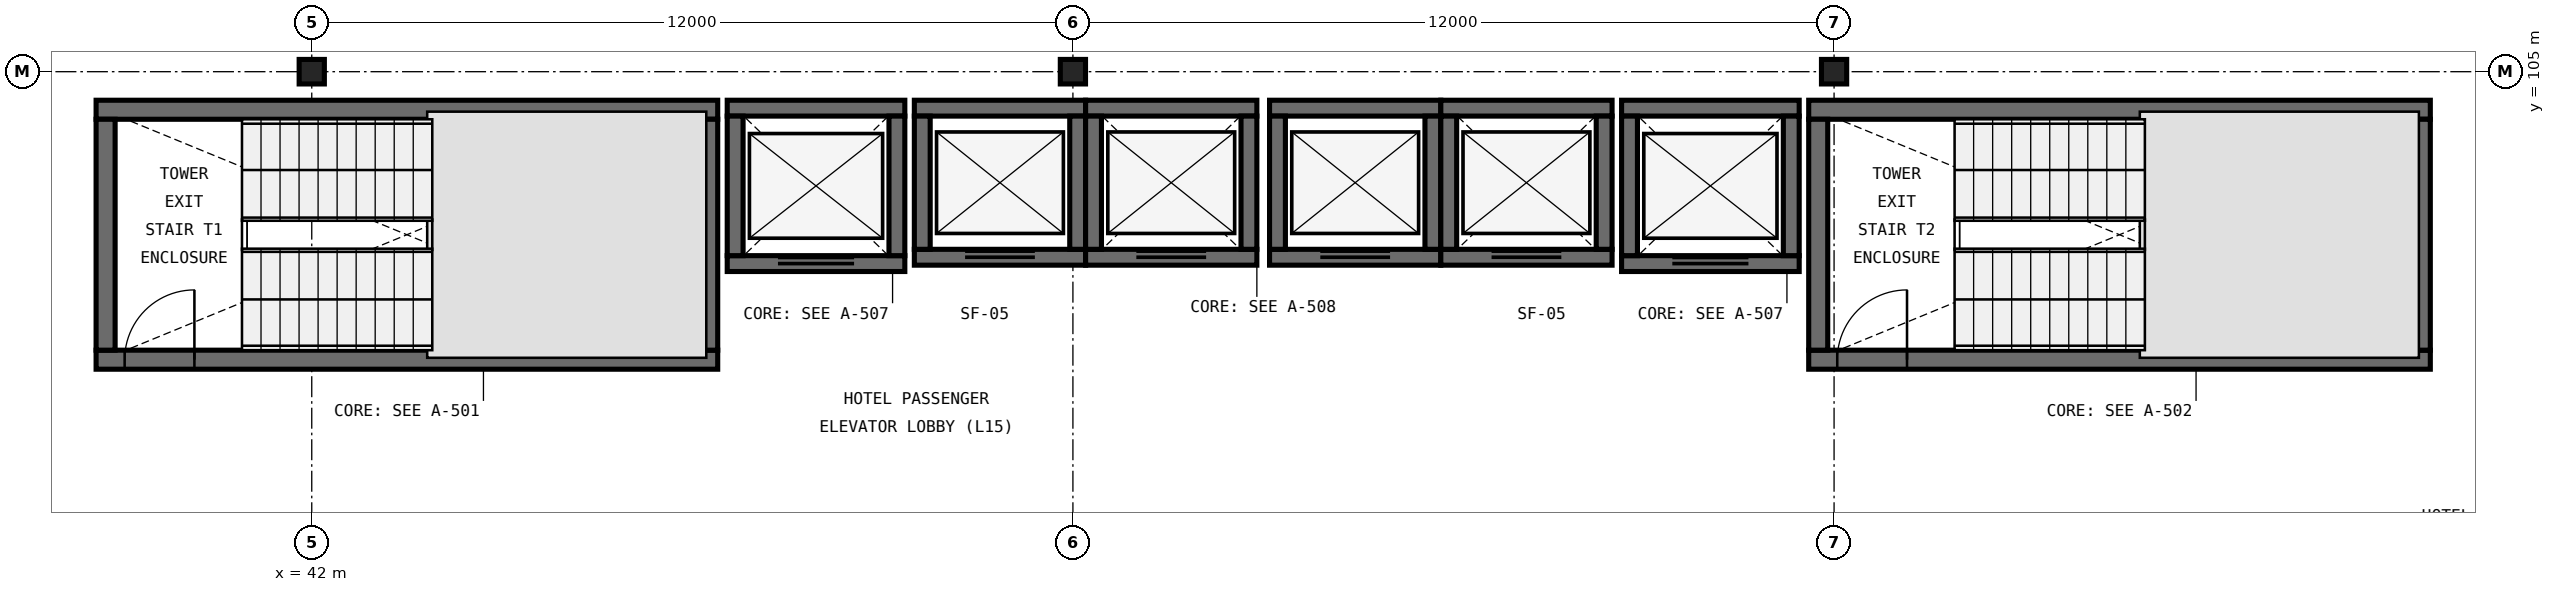
"""IFC4 building model, lengths in metres.
Left out: names, types, materials, properties, quantities, classifications, styles, units other than length and angle.
Written with IfcOpenShell. Run it as: python <this file> out.ifc"""

import sys

from ifc_helpers import new_model, si_unit, direction, frame, frame_2d, origin, origin_2d, place, context, subcontext, project, spatial, rectangle, i_section, extrude, element, fill, save


model = new_model("IFC4")
c1 = context("Model", 3, precision=1e-05, world=origin(), true_north=direction((0.0, 1.0)))
c2 = subcontext(c1, "Body", "Model", "MODEL_VIEW")
j1 = project(units=[si_unit("LENGTHUNIT", "METRE"), si_unit("PLANEANGLEUNIT", "RADIAN")], contexts=[c1])
p1 = place(None, origin())
s1 = spatial("IfcSite", under=j1, at=p1, CompositionType="ELEMENT")
p2 = place(p1, origin())
s2 = spatial("IfcBuilding", under=s1, at=p2, CompositionType="ELEMENT")
p3 = place(p2, frame((0.0, 0.0, 63.6)))
s3 = spatial("IfcBuildingStorey", under=s2, at=p3, CompositionType="ELEMENT", Elevation=63.6)
for number, where, z_axis, x_axis in (
    (1, (42.0, 105.0, 0.0), (0.0, 0.0, 1.0), (1.0, 0.0, 0.0)),
    (2, (54.0, 105.0, 0.0), (0.0, 0.0, 1.0), (1.0, 0.0, 0.0)),
    (3, (66.0, 105.0, 0.0), (0.0, 0.0, 1.0), (1.0, 0.0, 0.0)),
):
    element("IfcColumn", number, at=place(p3, frame(where, z_axis=z_axis, x_axis=x_axis)), inside=s3, PredefinedType="COLUMN", context=c2, shape_type="SweptSolid", body=[
        extrude(i_section(OverallWidth=0.398, OverallDepth=0.387, WebThickness=0.021, FlangeThickness=0.033, FilletRadius=0.031, at=origin_2d()), origin(), (0.0, 0.0, 1.0), 3.6),
    ])
p4 = place(p3, frame((38.6, 100.46, 0.0), z_axis=(0.0, 0.0, 1.0), x_axis=(1.0, 0.0, 0.0)))
e4 = element("IfcWall", 4, at=p4, inside=s3, PredefinedType="SHEAR", context=c2, shape_type="SweptSolid", body=[
    extrude(rectangle(XDim=9.8, YDim=0.3, at=frame_2d((4.9, 0.0))), origin(), (0.0, 0.0, 1.0), 3.6),
])
p5 = place(p4, frame((0.45, 0.0, 0.0)))
e5 = element("IfcOpeningElement", 5, at=p5, cuts=e4, PredefinedType="OPENING", context=c2, shape_type="SweptSolid", body=[
    extrude(rectangle(XDim=1.1, YDim=2.2, at=frame_2d((0.55, 1.1))), frame((0.0, 0.165, 0.0), z_axis=(0.0, -1.0, 0.0), x_axis=(1.0, 0.0, 0.0)), (0.0, 0.0, 1.0), 0.33),
])
p6 = place(p3, frame((48.4, 104.4, 0.0), z_axis=(0.0, 0.0, 1.0), x_axis=(-1.0, 0.0, 0.0)))
e6 = element("IfcWall", 6, at=p6, inside=s3, PredefinedType="SHEAR", context=c2, shape_type="SweptSolid", body=[
    extrude(rectangle(XDim=9.8, YDim=0.3, at=frame_2d((4.9, 0.0))), origin(), (0.0, 0.0, 1.0), 3.6),
])
for number, where, z_axis, x_axis in (
    (7, (38.75, 104.25, 0.0), (0.0, 0.0, 1.0), (0.0, -1.0, 0.0)),
    (8, (48.25, 100.61, 0.0), (0.0, 0.0, 1.0), (0.0, 1.0, 0.0)),
):
    element("IfcWall", number, at=place(p3, frame(where, z_axis=z_axis, x_axis=x_axis)), inside=s3, PredefinedType="SHEAR", context=c2, shape_type="SweptSolid", body=[
        extrude(rectangle(XDim=3.64, YDim=0.3, at=frame_2d((1.82, 0.0))), origin(), (0.0, 0.0, 1.0), 3.6),
    ])
p7 = place(p3, frame((65.6, 100.46, 0.0), z_axis=(0.0, 0.0, 1.0), x_axis=(1.0, 0.0, 0.0)))
e9 = element("IfcWall", 9, at=p7, inside=s3, PredefinedType="SHEAR", context=c2, shape_type="SweptSolid", body=[
    extrude(rectangle(XDim=9.8, YDim=0.3, at=frame_2d((4.9, 0.0))), origin(), (0.0, 0.0, 1.0), 3.6),
])
p8 = place(p7, frame((0.45, 0.0, 0.0)))
e10 = element("IfcOpeningElement", 10, at=p8, cuts=e9, PredefinedType="OPENING", context=c2, shape_type="SweptSolid", body=[
    extrude(rectangle(XDim=1.1, YDim=2.2, at=frame_2d((0.55, 1.1))), frame((0.0, 0.165, 0.0), z_axis=(0.0, -1.0, 0.0), x_axis=(1.0, 0.0, 0.0)), (0.0, 0.0, 1.0), 0.33),
])
p9 = place(p3, frame((75.4, 104.4, 0.0), z_axis=(0.0, 0.0, 1.0), x_axis=(-1.0, 0.0, 0.0)))
e11 = element("IfcWall", 11, at=p9, inside=s3, PredefinedType="SHEAR", context=c2, shape_type="SweptSolid", body=[
    extrude(rectangle(XDim=9.8, YDim=0.3, at=frame_2d((4.9, 0.0))), origin(), (0.0, 0.0, 1.0), 3.6),
])
for number, where, z_axis, x_axis in (
    (12, (65.75, 104.25, 0.0), (0.0, 0.0, 1.0), (0.0, -1.0, 0.0)),
    (13, (75.25, 100.61, 0.0), (0.0, 0.0, 1.0), (0.0, 1.0, 0.0)),
):
    element("IfcWall", number, at=place(p3, frame(where, z_axis=z_axis, x_axis=x_axis)), inside=s3, PredefinedType="SHEAR", context=c2, shape_type="SweptSolid", body=[
        extrude(rectangle(XDim=3.64, YDim=0.3, at=frame_2d((1.82, 0.0))), origin(), (0.0, 0.0, 1.0), 3.6),
    ])
p10 = place(p3, frame((48.55, 101.975, 0.0), z_axis=(0.0, 0.0, 1.0), x_axis=(1.0, 0.0, 0.0)))
e14 = element("IfcWall", 14, at=p10, inside=s3, PredefinedType="SHEAR", context=c2, shape_type="SweptSolid", body=[
    extrude(rectangle(XDim=2.8, YDim=0.25, at=frame_2d((1.4, 0.0))), origin(), (0.0, 0.0, 1.0), 3.6),
])
p11 = place(p10, frame((0.8, 0.0, 0.0)))
e15 = element("IfcOpeningElement", 15, at=p11, cuts=e14, PredefinedType="OPENING", context=c2, shape_type="SweptSolid", body=[
    extrude(rectangle(XDim=1.2, YDim=2.2, at=frame_2d((0.6, 1.1))), frame((0.0, 0.14, 0.0), z_axis=(0.0, -1.0, 0.0), x_axis=(1.0, 0.0, 0.0)), (0.0, 0.0, 1.0), 0.28),
])
p12 = place(p3, frame((51.35, 104.425, 0.0), z_axis=(0.0, 0.0, 1.0), x_axis=(-1.0, 0.0, 0.0)))
e16 = element("IfcWall", 16, at=p12, inside=s3, PredefinedType="SHEAR", context=c2, shape_type="SweptSolid", body=[
    extrude(rectangle(XDim=2.8, YDim=0.25, at=frame_2d((1.4, 0.0))), origin(), (0.0, 0.0, 1.0), 3.6),
])
for number, where, z_axis, x_axis in (
    (17, (48.675, 104.3, 0.0), (0.0, 0.0, 1.0), (0.0, -1.0, 0.0)),
    (18, (51.225, 102.1, 0.0), (0.0, 0.0, 1.0), (0.0, 1.0, 0.0)),
):
    element("IfcWall", number, at=place(p3, frame(where, z_axis=z_axis, x_axis=x_axis)), inside=s3, PredefinedType="SHEAR", context=c2, shape_type="SweptSolid", body=[
        extrude(rectangle(XDim=2.2, YDim=0.25, at=frame_2d((1.1, 0.0))), origin(), (0.0, 0.0, 1.0), 3.6),
    ])
p13 = place(p3, frame((62.65, 101.975, 0.0), z_axis=(0.0, 0.0, 1.0), x_axis=(1.0, 0.0, 0.0)))
e19 = element("IfcWall", 19, at=p13, inside=s3, PredefinedType="SHEAR", context=c2, shape_type="SweptSolid", body=[
    extrude(rectangle(XDim=2.8, YDim=0.25, at=frame_2d((1.4, 0.0))), origin(), (0.0, 0.0, 1.0), 3.6),
])
p14 = place(p13, frame((0.8, 0.0, 0.0)))
e20 = element("IfcOpeningElement", 20, at=p14, cuts=e19, PredefinedType="OPENING", context=c2, shape_type="SweptSolid", body=[
    extrude(rectangle(XDim=1.2, YDim=2.2, at=frame_2d((0.6, 1.1))), frame((0.0, 0.14, 0.0), z_axis=(0.0, -1.0, 0.0), x_axis=(1.0, 0.0, 0.0)), (0.0, 0.0, 1.0), 0.28),
])
p15 = place(p3, frame((65.45, 104.425, 0.0), z_axis=(0.0, 0.0, 1.0), x_axis=(-1.0, 0.0, 0.0)))
e21 = element("IfcWall", 21, at=p15, inside=s3, PredefinedType="SHEAR", context=c2, shape_type="SweptSolid", body=[
    extrude(rectangle(XDim=2.8, YDim=0.25, at=frame_2d((1.4, 0.0))), origin(), (0.0, 0.0, 1.0), 3.6),
])
for number, where, z_axis, x_axis in (
    (22, (62.775, 104.3, 0.0), (0.0, 0.0, 1.0), (0.0, -1.0, 0.0)),
    (23, (65.325, 102.1, 0.0), (0.0, 0.0, 1.0), (0.0, 1.0, 0.0)),
):
    element("IfcWall", number, at=place(p3, frame(where, z_axis=z_axis, x_axis=x_axis)), inside=s3, PredefinedType="SHEAR", context=c2, shape_type="SweptSolid", body=[
        extrude(rectangle(XDim=2.2, YDim=0.25, at=frame_2d((1.1, 0.0))), origin(), (0.0, 0.0, 1.0), 3.6),
    ])
p16 = place(p3, frame((51.5, 102.075, 0.0), z_axis=(0.0, 0.0, 1.0), x_axis=(1.0, 0.0, 0.0)))
e24 = element("IfcWall", 24, at=p16, inside=s3, PredefinedType="SHEAR", context=c2, shape_type="SweptSolid", body=[
    extrude(rectangle(XDim=2.7, YDim=0.25, at=frame_2d((1.35, 0.0))), origin(), (0.0, 0.0, 1.0), 3.6),
])
p17 = place(p16, frame((0.8, 0.0, 0.0)))
e25 = element("IfcOpeningElement", 25, at=p17, cuts=e24, PredefinedType="OPENING", context=c2, shape_type="SweptSolid", body=[
    extrude(rectangle(XDim=1.1, YDim=2.2, at=frame_2d((0.55, 1.1))), frame((0.0, 0.14, 0.0), z_axis=(0.0, -1.0, 0.0), x_axis=(1.0, 0.0, 0.0)), (0.0, 0.0, 1.0), 0.28),
])
p18 = place(p3, frame((54.2, 104.425, 0.0), z_axis=(0.0, 0.0, 1.0), x_axis=(-1.0, 0.0, 0.0)))
e26 = element("IfcWall", 26, at=p18, inside=s3, PredefinedType="SHEAR", context=c2, shape_type="SweptSolid", body=[
    extrude(rectangle(XDim=2.7, YDim=0.25, at=frame_2d((1.35, 0.0))), origin(), (0.0, 0.0, 1.0), 3.6),
])
for number, where, z_axis, x_axis in (
    (27, (51.625, 104.3, 0.0), (0.0, 0.0, 1.0), (0.0, -1.0, 0.0)),
    (28, (54.075, 102.2, 0.0), (0.0, 0.0, 1.0), (0.0, 1.0, 0.0)),
):
    element("IfcWall", number, at=place(p3, frame(where, z_axis=z_axis, x_axis=x_axis)), inside=s3, PredefinedType="SHEAR", context=c2, shape_type="SweptSolid", body=[
        extrude(rectangle(XDim=2.1, YDim=0.25, at=frame_2d((1.05, 0.0))), origin(), (0.0, 0.0, 1.0), 3.6),
    ])
p19 = place(p3, frame((54.2, 102.075, 0.0), z_axis=(0.0, 0.0, 1.0), x_axis=(1.0, 0.0, 0.0)))
e29 = element("IfcWall", 29, at=p19, inside=s3, PredefinedType="SHEAR", context=c2, shape_type="SweptSolid", body=[
    extrude(rectangle(XDim=2.7, YDim=0.25, at=frame_2d((1.35, 0.0))), origin(), (0.0, 0.0, 1.0), 3.6),
])
p20 = place(p19, frame((0.8, 0.0, 0.0)))
e30 = element("IfcOpeningElement", 30, at=p20, cuts=e29, PredefinedType="OPENING", context=c2, shape_type="SweptSolid", body=[
    extrude(rectangle(XDim=1.1, YDim=2.2, at=frame_2d((0.55, 1.1))), frame((0.0, 0.14, 0.0), z_axis=(0.0, -1.0, 0.0), x_axis=(1.0, 0.0, 0.0)), (0.0, 0.0, 1.0), 0.28),
])
p21 = place(p3, frame((56.9, 104.425, 0.0), z_axis=(0.0, 0.0, 1.0), x_axis=(-1.0, 0.0, 0.0)))
e31 = element("IfcWall", 31, at=p21, inside=s3, PredefinedType="SHEAR", context=c2, shape_type="SweptSolid", body=[
    extrude(rectangle(XDim=2.7, YDim=0.25, at=frame_2d((1.35, 0.0))), origin(), (0.0, 0.0, 1.0), 3.6),
])
for number, where, z_axis, x_axis in (
    (32, (54.325, 104.3, 0.0), (0.0, 0.0, 1.0), (0.0, -1.0, 0.0)),
    (33, (56.775, 102.2, 0.0), (0.0, 0.0, 1.0), (0.0, 1.0, 0.0)),
):
    element("IfcWall", number, at=place(p3, frame(where, z_axis=z_axis, x_axis=x_axis)), inside=s3, PredefinedType="SHEAR", context=c2, shape_type="SweptSolid", body=[
        extrude(rectangle(XDim=2.1, YDim=0.25, at=frame_2d((1.05, 0.0))), origin(), (0.0, 0.0, 1.0), 3.6),
    ])
p22 = place(p3, frame((57.1, 102.075, 0.0), z_axis=(0.0, 0.0, 1.0), x_axis=(1.0, 0.0, 0.0)))
e34 = element("IfcWall", 34, at=p22, inside=s3, PredefinedType="SHEAR", context=c2, shape_type="SweptSolid", body=[
    extrude(rectangle(XDim=2.7, YDim=0.25, at=frame_2d((1.35, 0.0))), origin(), (0.0, 0.0, 1.0), 3.6),
])
p23 = place(p22, frame((0.8, 0.0, 0.0)))
e35 = element("IfcOpeningElement", 35, at=p23, cuts=e34, PredefinedType="OPENING", context=c2, shape_type="SweptSolid", body=[
    extrude(rectangle(XDim=1.1, YDim=2.2, at=frame_2d((0.55, 1.1))), frame((0.0, 0.14, 0.0), z_axis=(0.0, -1.0, 0.0), x_axis=(1.0, 0.0, 0.0)), (0.0, 0.0, 1.0), 0.28),
])
p24 = place(p3, frame((59.8, 104.425, 0.0), z_axis=(0.0, 0.0, 1.0), x_axis=(-1.0, 0.0, 0.0)))
e36 = element("IfcWall", 36, at=p24, inside=s3, PredefinedType="SHEAR", context=c2, shape_type="SweptSolid", body=[
    extrude(rectangle(XDim=2.7, YDim=0.25, at=frame_2d((1.35, 0.0))), origin(), (0.0, 0.0, 1.0), 3.6),
])
for number, where, z_axis, x_axis in (
    (37, (57.225, 104.3, 0.0), (0.0, 0.0, 1.0), (0.0, -1.0, 0.0)),
    (38, (59.675, 102.2, 0.0), (0.0, 0.0, 1.0), (0.0, 1.0, 0.0)),
):
    element("IfcWall", number, at=place(p3, frame(where, z_axis=z_axis, x_axis=x_axis)), inside=s3, PredefinedType="SHEAR", context=c2, shape_type="SweptSolid", body=[
        extrude(rectangle(XDim=2.1, YDim=0.25, at=frame_2d((1.05, 0.0))), origin(), (0.0, 0.0, 1.0), 3.6),
    ])
p25 = place(p3, frame((59.8, 102.075, 0.0), z_axis=(0.0, 0.0, 1.0), x_axis=(1.0, 0.0, 0.0)))
e39 = element("IfcWall", 39, at=p25, inside=s3, PredefinedType="SHEAR", context=c2, shape_type="SweptSolid", body=[
    extrude(rectangle(XDim=2.7, YDim=0.25, at=frame_2d((1.35, 0.0))), origin(), (0.0, 0.0, 1.0), 3.6),
])
p26 = place(p25, frame((0.8, 0.0, 0.0)))
e40 = element("IfcOpeningElement", 40, at=p26, cuts=e39, PredefinedType="OPENING", context=c2, shape_type="SweptSolid", body=[
    extrude(rectangle(XDim=1.1, YDim=2.2, at=frame_2d((0.55, 1.1))), frame((0.0, 0.14, 0.0), z_axis=(0.0, -1.0, 0.0), x_axis=(1.0, 0.0, 0.0)), (0.0, 0.0, 1.0), 0.28),
])
p27 = place(p3, frame((62.5, 104.425, 0.0), z_axis=(0.0, 0.0, 1.0), x_axis=(-1.0, 0.0, 0.0)))
e41 = element("IfcWall", 41, at=p27, inside=s3, PredefinedType="SHEAR", context=c2, shape_type="SweptSolid", body=[
    extrude(rectangle(XDim=2.7, YDim=0.25, at=frame_2d((1.35, 0.0))), origin(), (0.0, 0.0, 1.0), 3.6),
])
for number, where, z_axis, x_axis in (
    (42, (59.925, 104.3, 0.0), (0.0, 0.0, 1.0), (0.0, -1.0, 0.0)),
    (43, (62.375, 102.2, 0.0), (0.0, 0.0, 1.0), (0.0, 1.0, 0.0)),
):
    element("IfcWall", number, at=place(p3, frame(where, z_axis=z_axis, x_axis=x_axis)), inside=s3, PredefinedType="SHEAR", context=c2, shape_type="SweptSolid", body=[
        extrude(rectangle(XDim=2.1, YDim=0.25, at=frame_2d((1.05, 0.0))), origin(), (0.0, 0.0, 1.0), 3.6),
    ])
p28 = place(p5, origin())
e44 = element("IfcDoor", 44, at=p28, inside=s3, OperationType="SINGLE_SWING_RIGHT", PredefinedType="DOOR", context=c2, shape_type="SweptSolid", body=[
    extrude(rectangle(XDim=1.1, YDim=2.2, at=frame_2d((0.55, 1.1))), frame((0.0, 0.025, 0.0), z_axis=(0.0, -1.0, 0.0), x_axis=(1.0, 0.0, 0.0)), (0.0, 0.0, 1.0), 0.05),
])
fill(e5, e44)
p29 = place(p8, origin())
e45 = element("IfcDoor", 45, at=p29, inside=s3, OperationType="SINGLE_SWING_RIGHT", PredefinedType="DOOR", context=c2, shape_type="SweptSolid", body=[
    extrude(rectangle(XDim=1.1, YDim=2.2, at=frame_2d((0.55, 1.1))), frame((0.0, 0.025, 0.0), z_axis=(0.0, -1.0, 0.0), x_axis=(1.0, 0.0, 0.0)), (0.0, 0.0, 1.0), 0.05),
])
fill(e10, e45)
p30 = place(p11, origin())
e46 = element("IfcDoor", 46, at=p30, inside=s3, OperationType="DOUBLE_DOOR_SLIDING", PredefinedType="DOOR", context=c2, shape_type="SweptSolid", body=[
    extrude(rectangle(XDim=1.2, YDim=2.2, at=frame_2d((0.6, 1.1))), frame((0.0, 0.025, 0.0), z_axis=(0.0, -1.0, 0.0), x_axis=(1.0, 0.0, 0.0)), (0.0, 0.0, 1.0), 0.05),
])
fill(e15, e46)
p31 = place(p14, origin())
e47 = element("IfcDoor", 47, at=p31, inside=s3, OperationType="DOUBLE_DOOR_SLIDING", PredefinedType="DOOR", context=c2, shape_type="SweptSolid", body=[
    extrude(rectangle(XDim=1.2, YDim=2.2, at=frame_2d((0.6, 1.1))), frame((0.0, 0.025, 0.0), z_axis=(0.0, -1.0, 0.0), x_axis=(1.0, 0.0, 0.0)), (0.0, 0.0, 1.0), 0.05),
])
fill(e20, e47)
p32 = place(p17, origin())
e48 = element("IfcDoor", 48, at=p32, inside=s3, OperationType="DOUBLE_DOOR_SLIDING", PredefinedType="DOOR", context=c2, shape_type="SweptSolid", body=[
    extrude(rectangle(XDim=1.1, YDim=2.2, at=frame_2d((0.55, 1.1))), frame((0.0, 0.025, 0.0), z_axis=(0.0, -1.0, 0.0), x_axis=(1.0, 0.0, 0.0)), (0.0, 0.0, 1.0), 0.05),
])
fill(e25, e48)
p33 = place(p20, origin())
e49 = element("IfcDoor", 49, at=p33, inside=s3, OperationType="DOUBLE_DOOR_SLIDING", PredefinedType="DOOR", context=c2, shape_type="SweptSolid", body=[
    extrude(rectangle(XDim=1.1, YDim=2.2, at=frame_2d((0.55, 1.1))), frame((0.0, 0.025, 0.0), z_axis=(0.0, -1.0, 0.0), x_axis=(1.0, 0.0, 0.0)), (0.0, 0.0, 1.0), 0.05),
])
fill(e30, e49)
p34 = place(p23, origin())
e50 = element("IfcDoor", 50, at=p34, inside=s3, OperationType="DOUBLE_DOOR_SLIDING", PredefinedType="DOOR", context=c2, shape_type="SweptSolid", body=[
    extrude(rectangle(XDim=1.1, YDim=2.2, at=frame_2d((0.55, 1.1))), frame((0.0, 0.025, 0.0), z_axis=(0.0, -1.0, 0.0), x_axis=(1.0, 0.0, 0.0)), (0.0, 0.0, 1.0), 0.05),
])
fill(e35, e50)
p35 = place(p26, origin())
e51 = element("IfcDoor", 51, at=p35, inside=s3, OperationType="DOUBLE_DOOR_SLIDING", PredefinedType="DOOR", context=c2, shape_type="SweptSolid", body=[
    extrude(rectangle(XDim=1.1, YDim=2.2, at=frame_2d((0.55, 1.1))), frame((0.0, 0.025, 0.0), z_axis=(0.0, -1.0, 0.0), x_axis=(1.0, 0.0, 0.0)), (0.0, 0.0, 1.0), 0.05),
])
fill(e40, e51)
save(model, sys.argv[1])
